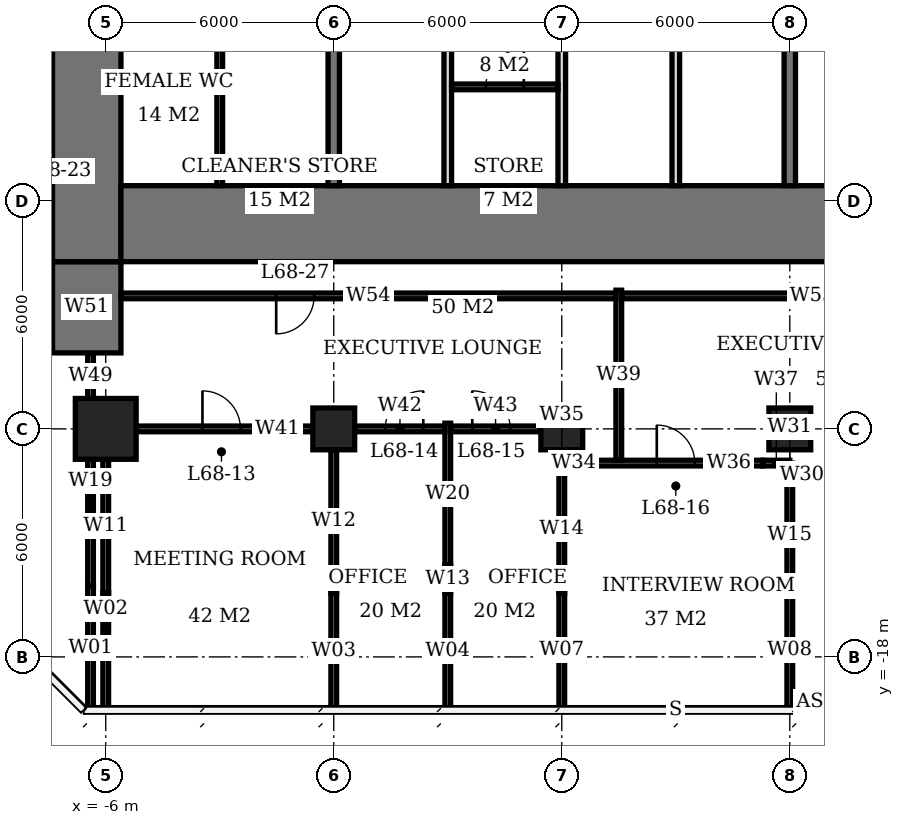
"""IFC4 building model, lengths in metres.
Left out: names, types, materials, properties, quantities, classifications, styles, units other than length and angle.
Written with IfcOpenShell. Run it as: python <this file> out.ifc"""

import sys

from ifc_helpers import new_model, si_unit, direction, frame, frame_2d, origin, origin_2d, place, context, subcontext, project, spatial, rectangle, extrude, element, fill, save


model = new_model("IFC4")
c1 = context("Model", 3, precision=1e-05, world=origin(), true_north=direction((0.0, 1.0)))
c2 = subcontext(c1, "Body", "Model", "MODEL_VIEW")
j1 = project(units=[si_unit("LENGTHUNIT", "METRE"), si_unit("PLANEANGLEUNIT", "RADIAN")], contexts=[c1])
p1 = place(None, origin())
s1 = spatial("IfcSite", under=j1, at=p1, CompositionType="ELEMENT")
p2 = place(p1, origin())
s2 = spatial("IfcBuilding", under=s1, at=p2, CompositionType="ELEMENT")
p3 = place(p2, frame((0.0, 0.0, 276.2)))
s3 = spatial("IfcBuildingStorey", under=s2, at=p3, CompositionType="ELEMENT", Elevation=276.2)
p4 = place(p3, frame((-6.0, -12.0, 0.0), z_axis=(0.0, 0.0, 1.0), x_axis=(1.0, 0.0, 0.0)))
e1 = element("IfcColumn", 1, at=p4, inside=s3, PredefinedType="COLUMN", context=c2, shape_type="SweptSolid", body=[
    extrude(rectangle(XDim=1.6, YDim=1.6, at=origin_2d()), origin(), (0.0, 0.0, 1.0), 3.9),
])
for number, where, z_axis, x_axis in (
    (2, (0.0, -12.0, 0.0), (0.0, 0.0, 1.0), (1.0, 0.0, 0.0)),
    (3, (6.0, -12.0, 0.0), (0.0, 0.0, 1.0), (1.0, 0.0, 0.0)),
    (4, (12.0, -12.0, 0.0), (0.0, 0.0, 1.0), (1.0, 0.0, 0.0)),
):
    element("IfcColumn", number, at=place(p3, frame(where, z_axis=z_axis, x_axis=x_axis)), inside=s3, PredefinedType="COLUMN", context=c2, shape_type="SweptSolid", body=[
        extrude(rectangle(XDim=1.1, YDim=1.1, at=origin_2d()), origin(), (0.0, 0.0, 1.0), 3.9),
    ])
p5 = place(p3, frame((-5.6, -6.6, 0.0), z_axis=(0.0, 0.0, 1.0), x_axis=(1.0, 0.0, 0.0)))
e5 = element("IfcWall", 5, at=p5, inside=s3, PredefinedType="SHEAR", context=c2, shape_type="SweptSolid", body=[
    extrude(rectangle(XDim=23.2, YDim=2.0, at=frame_2d((11.6, 0.0))), origin(), (0.0, 0.0, 1.0), 3.9),
])
p6 = place(p3, frame((-6.5, -7.6, 0.0), z_axis=(0.0, 0.0, 1.0), x_axis=(0.0, 1.0, 0.0)))
e6 = element("IfcWall", 6, at=p6, inside=s3, PredefinedType="SHEAR", context=c2, shape_type="SweptSolid", body=[
    extrude(rectangle(XDim=21.2, YDim=1.8, at=frame_2d((10.6, 0.0))), origin(), (0.0, 0.0, 1.0), 3.9),
])
p7 = place(p6, frame((7.8, 0.0, 0.0)))
e7 = element("IfcOpeningElement", 7, at=p7, cuts=e6, PredefinedType="OPENING", context=c2, shape_type="SweptSolid", body=[
    extrude(rectangle(XDim=1.8, YDim=2.4, at=frame_2d((0.9, 1.2))), frame((0.0, 0.91, 0.0), z_axis=(0.0, -1.0, 0.0), x_axis=(1.0, 0.0, 0.0)), (0.0, 0.0, 1.0), 1.82),
])
p8 = place(p3, frame((-6.5, -10.0, 0.0), z_axis=(0.0, 0.0, 1.0), x_axis=(0.0, 1.0, 0.0)))
e8 = element("IfcWall", 8, at=p8, inside=s3, PredefinedType="SHEAR", context=c2, shape_type="SweptSolid", body=[
    extrude(rectangle(XDim=2.4, YDim=1.8, at=frame_2d((1.2, 0.0))), origin(), (0.0, 0.0, 1.0), 3.9),
])
for number, where, z_axis, x_axis in (
    (9, (0.0, -5.6, 0.0), (0.0, 0.0, 1.0), (0.0, 1.0, 0.0)),
    (10, (12.0, -5.6, 0.0), (0.0, 0.0, 1.0), (0.0, 1.0, 0.0)),
):
    element("IfcWall", number, at=place(p3, frame(where, z_axis=z_axis, x_axis=x_axis)), inside=s3, PredefinedType="SHEAR", context=c2, shape_type="SweptSolid", body=[
        extrude(rectangle(XDim=5.45, YDim=0.3, at=frame_2d((2.725, 0.0))), origin(), (0.0, 0.0, 1.0), 3.9),
    ])
for number, where, z_axis, x_axis in (
    (11, (3.0, -5.6, 0.0), (0.0, 0.0, 1.0), (0.0, 1.0, 0.0)),
    (12, (6.0, -5.6, 0.0), (0.0, 0.0, 1.0), (0.0, 1.0, 0.0)),
    (13, (9.0, -5.6, 0.0), (0.0, 0.0, 1.0), (0.0, 1.0, 0.0)),
):
    element("IfcWall", number, at=place(p3, frame(where, z_axis=z_axis, x_axis=x_axis)), inside=s3, PredefinedType="SOLIDWALL", context=c2, shape_type="SweptSolid", body=[
        extrude(rectangle(XDim=5.45, YDim=0.2, at=frame_2d((2.725, 0.0))), origin(), (0.0, 0.0, 1.0), 3.9),
    ])
p9 = place(p3, frame((-3.0, -5.6, 0.0), z_axis=(0.0, 0.0, 1.0), x_axis=(0.0, 1.0, 0.0)))
e14 = element("IfcWall", 14, at=p9, inside=s3, PredefinedType="PLUMBINGWALL", context=c2, shape_type="SweptSolid", body=[
    extrude(rectangle(XDim=5.45, YDim=0.15, at=frame_2d((2.725, 0.0))), origin(), (0.0, 0.0, 1.0), 3.65),
])
p10 = place(p3, frame((3.1, -3.0, 0.0), z_axis=(0.0, 0.0, 1.0), x_axis=(1.0, 0.0, 0.0)))
e15 = element("IfcWall", 15, at=p10, inside=s3, PredefinedType="PARTITIONING", context=c2, shape_type="SweptSolid", body=[
    extrude(rectangle(XDim=2.8, YDim=0.15, at=frame_2d((1.4, 0.0))), origin(), (0.0, 0.0, 1.0), 3.65),
])
p11 = place(p10, frame((0.9, 0.0, 0.0)))
e16 = element("IfcOpeningElement", 16, at=p11, cuts=e15, PredefinedType="OPENING", context=c2, shape_type="SweptSolid", body=[
    extrude(rectangle(XDim=1.0, YDim=2.1, at=frame_2d((0.5, 1.05))), frame((0.0, 0.085, 0.0), z_axis=(0.0, -1.0, 0.0), x_axis=(1.0, 0.0, 0.0)), (0.0, 0.0, 1.0), 0.17),
])
p12 = place(p3, frame((11.925, -13.2, 0.0), z_axis=(0.0, 0.0, 1.0), x_axis=(1.0, 0.0, 0.0)))
e17 = element("IfcWall", 17, at=p12, inside=s3, PredefinedType="PARTITIONING", context=c2, shape_type="SweptSolid", body=[
    extrude(rectangle(XDim=0.785, YDim=0.15, at=frame_2d((0.393, 0.0))), origin(), (0.0, 0.0, 1.0), 2.65),
])
p13 = place(p3, frame((12.71, -13.2, 0.0), z_axis=(0.0, 0.0, 1.0), x_axis=(1.0, 0.0, 0.0)))
e18 = element("IfcWall", 18, at=p13, inside=s3, PredefinedType="PARTITIONING", context=c2, shape_type="SweptSolid", body=[
    extrude(rectangle(XDim=4.698, YDim=0.15, at=frame_2d((2.349, 0.0))), origin(), (0.0, 0.0, 1.0), 3.65),
])
p14 = place(p13, frame((1.849, 0.0, 0.0)))
e19 = element("IfcOpeningElement", 19, at=p14, cuts=e18, PredefinedType="OPENING", context=c2, shape_type="SweptSolid", body=[
    extrude(rectangle(XDim=1.0, YDim=2.4, at=frame_2d((0.5, 1.2))), frame((0.0, 0.085, 0.0), z_axis=(0.0, -1.0, 0.0), x_axis=(1.0, 0.0, 0.0)), (0.0, 0.0, 1.0), 0.17),
])
p15 = place(p3, frame((5.925, -12.9, 0.0), z_axis=(0.0, 0.0, 1.0), x_axis=(1.0, 0.0, 0.0)))
e20 = element("IfcWall", 20, at=p15, inside=s3, PredefinedType="PARTITIONING", context=c2, shape_type="SweptSolid", body=[
    extrude(rectangle(XDim=0.785, YDim=0.15, at=frame_2d((0.393, 0.0))), origin(), (0.0, 0.0, 1.0), 2.65),
])
p16 = place(p3, frame((6.71, -12.9, 0.0), z_axis=(0.0, 0.0, 1.0), x_axis=(1.0, 0.0, 0.0)))
e21 = element("IfcWall", 21, at=p16, inside=s3, PredefinedType="PARTITIONING", context=c2, shape_type="SweptSolid", body=[
    extrude(rectangle(XDim=4.58, YDim=0.15, at=frame_2d((2.29, 0.0))), origin(), (0.0, 0.0, 1.0), 3.65),
])
p17 = place(p16, frame((1.79, 0.0, 0.0)))
e22 = element("IfcOpeningElement", 22, at=p17, cuts=e21, PredefinedType="OPENING", context=c2, shape_type="SweptSolid", body=[
    extrude(rectangle(XDim=1.0, YDim=2.4, at=frame_2d((0.5, 1.2))), frame((0.0, 0.085, 0.0), z_axis=(0.0, -1.0, 0.0), x_axis=(1.0, 0.0, 0.0)), (0.0, 0.0, 1.0), 0.17),
])
p18 = place(p3, frame((11.29, -12.9, 0.0), z_axis=(0.0, 0.0, 1.0), x_axis=(1.0, 0.0, 0.0)))
e23 = element("IfcWall", 23, at=p18, inside=s3, PredefinedType="PARTITIONING", context=c2, shape_type="SweptSolid", body=[
    extrude(rectangle(XDim=0.71, YDim=0.15, at=frame_2d((0.355, 0.0))), origin(), (0.0, 0.0, 1.0), 2.65),
])
p19 = place(p3, frame((-5.2, -12.0, 0.0), z_axis=(0.0, 0.0, 1.0), x_axis=(1.0, 0.0, 0.0)))
e24 = element("IfcWall", 24, at=p19, inside=s3, PredefinedType="PARTITIONING", context=c2, shape_type="SweptSolid", body=[
    extrude(rectangle(XDim=4.64, YDim=0.15, at=frame_2d((2.32, 0.0))), origin(), (0.0, 0.0, 1.0), 3.65),
])
p20 = place(p19, frame((1.745, 0.0, 0.0)))
e25 = element("IfcOpeningElement", 25, at=p20, cuts=e24, PredefinedType="OPENING", context=c2, shape_type="SweptSolid", body=[
    extrude(rectangle(XDim=1.0, YDim=2.4, at=frame_2d((0.5, 1.2))), frame((0.0, 0.085, 0.0), z_axis=(0.0, -1.0, 0.0), x_axis=(1.0, 0.0, 0.0)), (0.0, 0.0, 1.0), 0.17),
])
p21 = place(p3, frame((0.56, -12.0, 0.0), z_axis=(0.0, 0.0, 1.0), x_axis=(1.0, 0.0, 0.0)))
e26 = element("IfcWall", 26, at=p21, inside=s3, PredefinedType="PARTITIONING", context=c2, shape_type="SweptSolid", body=[
    extrude(rectangle(XDim=2.365, YDim=0.15, at=frame_2d((1.183, 0.0))), origin(), (0.0, 0.0, 1.0), 3.65),
])
p22 = place(p21, frame((0.795, 0.0, 0.0)))
e27 = element("IfcOpeningElement", 27, at=p22, cuts=e26, PredefinedType="OPENING", context=c2, shape_type="SweptSolid", body=[
    extrude(rectangle(XDim=1.0, YDim=2.4, at=frame_2d((0.5, 1.2))), frame((0.0, 0.085, 0.0), z_axis=(0.0, -1.0, 0.0), x_axis=(1.0, 0.0, 0.0)), (0.0, 0.0, 1.0), 0.17),
])
p23 = place(p3, frame((3.075, -12.0, 0.0), z_axis=(0.0, 0.0, 1.0), x_axis=(1.0, 0.0, 0.0)))
e28 = element("IfcWall", 28, at=p23, inside=s3, PredefinedType="PARTITIONING", context=c2, shape_type="SweptSolid", body=[
    extrude(rectangle(XDim=2.365, YDim=0.15, at=frame_2d((1.183, 0.0))), origin(), (0.0, 0.0, 1.0), 3.65),
])
p24 = place(p23, frame((0.57, 0.0, 0.0)))
e29 = element("IfcOpeningElement", 29, at=p24, cuts=e28, PredefinedType="OPENING", context=c2, shape_type="SweptSolid", body=[
    extrude(rectangle(XDim=1.0, YDim=2.4, at=frame_2d((0.5, 1.2))), frame((0.0, 0.085, 0.0), z_axis=(0.0, -1.0, 0.0), x_axis=(1.0, 0.0, 0.0)), (0.0, 0.0, 1.0), 0.17),
])
p25 = place(p3, frame((-6.0, -19.375, 0.0), z_axis=(0.0, 0.0, 1.0), x_axis=(0.0, 1.0, 0.0)))
e30 = element("IfcWall", 30, at=p25, inside=s3, PredefinedType="PARTITIONING", context=c2, shape_type="SweptSolid", body=[
    extrude(rectangle(XDim=3.065, YDim=0.15, at=frame_2d((1.532, 0.0))), origin(), (0.0, 0.0, 1.0), 3.65),
])
p26 = place(p3, frame((-6.0, -16.31, 0.0), z_axis=(0.0, 0.0, 1.0), x_axis=(0.0, 1.0, 0.0)))
e31 = element("IfcWall", 31, at=p26, inside=s3, PredefinedType="PARTITIONING", context=c2, shape_type="SweptSolid", body=[
    extrude(rectangle(XDim=3.51, YDim=0.15, at=frame_2d((1.755, 0.0))), origin(), (0.0, 0.0, 1.0), 2.65),
])
p27 = place(p3, frame((0.0, -19.375, 0.0), z_axis=(0.0, 0.0, 1.0), x_axis=(0.0, 1.0, 0.0)))
e32 = element("IfcWall", 32, at=p27, inside=s3, PredefinedType="PARTITIONING", context=c2, shape_type="SweptSolid", body=[
    extrude(rectangle(XDim=3.065, YDim=0.15, at=frame_2d((1.532, 0.0))), origin(), (0.0, 0.0, 1.0), 3.65),
])
p28 = place(p3, frame((0.0, -16.31, 0.0), z_axis=(0.0, 0.0, 1.0), x_axis=(0.0, 1.0, 0.0)))
e33 = element("IfcWall", 33, at=p28, inside=s3, PredefinedType="PARTITIONING", context=c2, shape_type="SweptSolid", body=[
    extrude(rectangle(XDim=3.76, YDim=0.15, at=frame_2d((1.88, 0.0))), origin(), (0.0, 0.0, 1.0), 2.65),
])
p29 = place(p3, frame((3.0, -19.375, 0.0), z_axis=(0.0, 0.0, 1.0), x_axis=(0.0, 1.0, 0.0)))
e34 = element("IfcWall", 34, at=p29, inside=s3, PredefinedType="PARTITIONING", context=c2, shape_type="SweptSolid", body=[
    extrude(rectangle(XDim=3.065, YDim=0.15, at=frame_2d((1.532, 0.0))), origin(), (0.0, 0.0, 1.0), 3.65),
])
p30 = place(p3, frame((3.0, -16.31, 0.0), z_axis=(0.0, 0.0, 1.0), x_axis=(0.0, 1.0, 0.0)))
e35 = element("IfcWall", 35, at=p30, inside=s3, PredefinedType="PARTITIONING", context=c2, shape_type="SweptSolid", body=[
    extrude(rectangle(XDim=0.72, YDim=0.15, at=frame_2d((0.36, 0.0))), origin(), (0.0, 0.0, 1.0), 2.65),
])
p31 = place(p3, frame((3.0, -15.59, 0.0), z_axis=(0.0, 0.0, 1.0), x_axis=(0.0, 1.0, 0.0)))
e36 = element("IfcWall", 36, at=p31, inside=s3, PredefinedType="PARTITIONING", context=c2, shape_type="SweptSolid", body=[
    extrude(rectangle(XDim=3.74, YDim=0.15, at=frame_2d((1.87, 0.0))), origin(), (0.0, 0.0, 1.0), 3.65),
])
p32 = place(p3, frame((6.0, -19.35, 0.0), z_axis=(0.0, 0.0, 1.0), x_axis=(0.0, 1.0, 0.0)))
e37 = element("IfcWall", 37, at=p32, inside=s3, PredefinedType="PARTITIONING", context=c2, shape_type="SweptSolid", body=[
    extrude(rectangle(XDim=3.04, YDim=0.15, at=frame_2d((1.52, 0.0))), origin(), (0.0, 0.0, 1.0), 3.65),
])
p33 = place(p3, frame((6.0, -16.31, 0.0), z_axis=(0.0, 0.0, 1.0), x_axis=(0.0, 1.0, 0.0)))
e38 = element("IfcWall", 38, at=p33, inside=s3, PredefinedType="PARTITIONING", context=c2, shape_type="SweptSolid", body=[
    extrude(rectangle(XDim=3.335, YDim=0.15, at=frame_2d((1.667, 0.0))), origin(), (0.0, 0.0, 1.0), 2.65),
])
p34 = place(p3, frame((6.0, -12.9, 0.0), z_axis=(0.0, 0.0, 1.0), x_axis=(0.0, 1.0, 0.0)))
e39 = element("IfcWall", 39, at=p34, inside=s3, PredefinedType="PARTITIONING", context=c2, shape_type="SweptSolid", body=[
    extrude(rectangle(XDim=0.35, YDim=0.15, at=frame_2d((0.175, 0.0))), origin(), (0.0, 0.0, 1.0), 2.65),
])
p35 = place(p3, frame((12.0, -19.35, 0.0), z_axis=(0.0, 0.0, 1.0), x_axis=(0.0, 1.0, 0.0)))
e40 = element("IfcWall", 40, at=p35, inside=s3, PredefinedType="PARTITIONING", context=c2, shape_type="SweptSolid", body=[
    extrude(rectangle(XDim=3.04, YDim=0.15, at=frame_2d((1.52, 0.0))), origin(), (0.0, 0.0, 1.0), 3.65),
])
p36 = place(p3, frame((12.0, -16.31, 0.0), z_axis=(0.0, 0.0, 1.0), x_axis=(0.0, 1.0, 0.0)))
e41 = element("IfcWall", 41, at=p36, inside=s3, PredefinedType="PARTITIONING", context=c2, shape_type="SweptSolid", body=[
    extrude(rectangle(XDim=3.035, YDim=0.15, at=frame_2d((1.518, 0.0))), origin(), (0.0, 0.0, 1.0), 2.65),
])
p37 = place(p3, frame((12.0, -13.2, 0.0), z_axis=(0.0, 0.0, 1.0), x_axis=(0.0, 1.0, 0.0)))
e42 = element("IfcWall", 42, at=p37, inside=s3, PredefinedType="PARTITIONING", context=c2, shape_type="SweptSolid", body=[
    extrude(rectangle(XDim=0.3, YDim=0.15, at=frame_2d((0.15, 0.0))), origin(), (0.0, 0.0, 1.0), 2.65),
])
p38 = place(p3, frame((-6.4, -19.375, 0.0), z_axis=(0.0, 0.0, 1.0), x_axis=(0.0, 1.0, 0.0)))
e43 = element("IfcWall", 43, at=p38, inside=s3, PredefinedType="PARTITIONING", context=c2, shape_type="SweptSolid", body=[
    extrude(rectangle(XDim=3.235, YDim=0.15, at=frame_2d((1.618, 0.0))), origin(), (0.0, 0.0, 1.0), 3.65),
])
p39 = place(p3, frame((-6.4, -16.14, 0.0), z_axis=(0.0, 0.0, 1.0), x_axis=(0.0, 1.0, 0.0)))
e44 = element("IfcWall", 44, at=p39, inside=s3, PredefinedType="PARTITIONING", context=c2, shape_type="SweptSolid", body=[
    extrude(rectangle(XDim=3.34, YDim=0.15, at=frame_2d((1.67, 0.0))), origin(), (0.0, 0.0, 1.0), 2.65),
])
p40 = place(p3, frame((-6.4, -11.2, 0.0), z_axis=(0.0, 0.0, 1.0), x_axis=(0.0, 1.0, 0.0)))
e45 = element("IfcWall", 45, at=p40, inside=s3, PredefinedType="PARTITIONING", context=c2, shape_type="SweptSolid", body=[
    extrude(rectangle(XDim=1.2, YDim=0.15, at=frame_2d((0.6, 0.0))), origin(), (0.0, 0.0, 1.0), 3.65),
])
p41 = place(p3, frame((7.425, -8.5, 0.0), z_axis=(0.0, 0.0, 1.0), x_axis=(-1.0, 0.0, 0.0)))
e46 = element("IfcWall", 46, at=p41, inside=s3, PredefinedType="PARTITIONING", context=c2, shape_type="SweptSolid", body=[
    extrude(rectangle(XDim=13.025, YDim=0.15, at=frame_2d((6.513, 0.0))), origin(), (0.0, 0.0, 1.0), 3.65),
])
p42 = place(p41, frame((7.94, 0.0, 0.0)))
e47 = element("IfcOpeningElement", 47, at=p42, cuts=e46, PredefinedType="OPENING", context=c2, shape_type="SweptSolid", body=[
    extrude(rectangle(XDim=1.0, YDim=2.4, at=frame_2d((0.5, 1.2))), frame((0.0, 0.085, 0.0), z_axis=(0.0, -1.0, 0.0), x_axis=(1.0, 0.0, 0.0)), (0.0, 0.0, 1.0), 0.17),
])
p43 = place(p3, frame((7.5, -12.825, 0.0), z_axis=(0.0, 0.0, 1.0), x_axis=(0.0, 1.0, 0.0)))
e48 = element("IfcWall", 48, at=p43, inside=s3, PredefinedType="PARTITIONING", context=c2, shape_type="SweptSolid", body=[
    extrude(rectangle(XDim=4.475, YDim=0.15, at=frame_2d((2.237, 0.0))), origin(), (0.0, 0.0, 1.0), 3.65),
])
p44 = place(p3, frame((7.575, -8.5, 0.0), z_axis=(0.0, 0.0, 1.0), x_axis=(1.0, 0.0, 0.0)))
e49 = element("IfcWall", 49, at=p44, inside=s3, PredefinedType="PARTITIONING", context=c2, shape_type="SweptSolid", body=[
    extrude(rectangle(XDim=10.025, YDim=0.15, at=frame_2d((5.013, 0.0))), origin(), (0.0, 0.0, 1.0), 3.65),
])
p45 = place(p11, origin())
e50 = element("IfcDoor", 50, at=p45, inside=s3, OperationType="SINGLE_SWING_RIGHT", PredefinedType="DOOR", context=c2, shape_type="SweptSolid", body=[
    extrude(rectangle(XDim=1.0, YDim=2.1, at=frame_2d((0.5, 1.05))), frame((0.0, 0.025, 0.0), z_axis=(0.0, -1.0, 0.0), x_axis=(1.0, 0.0, 0.0)), (0.0, 0.0, 1.0), 0.05),
])
fill(e16, e50)
p46 = place(p20, origin())
e51 = element("IfcDoor", 51, at=p46, inside=s3, OperationType="SINGLE_SWING_LEFT", PredefinedType="DOOR", context=c2, shape_type="SweptSolid", body=[
    extrude(rectangle(XDim=1.0, YDim=2.4, at=frame_2d((0.5, 1.2))), frame((0.0, 0.025, 0.0), z_axis=(0.0, -1.0, 0.0), x_axis=(1.0, 0.0, 0.0)), (0.0, 0.0, 1.0), 0.05),
])
fill(e25, e51)
p47 = place(p22, origin())
e52 = element("IfcDoor", 52, at=p47, inside=s3, OperationType="SINGLE_SWING_RIGHT", PredefinedType="DOOR", context=c2, shape_type="SweptSolid", body=[
    extrude(rectangle(XDim=1.0, YDim=2.4, at=frame_2d((0.5, 1.2))), frame((0.0, 0.025, 0.0), z_axis=(0.0, -1.0, 0.0), x_axis=(1.0, 0.0, 0.0)), (0.0, 0.0, 1.0), 0.05),
])
fill(e27, e52)
p48 = place(p24, origin())
e53 = element("IfcDoor", 53, at=p48, inside=s3, OperationType="SINGLE_SWING_LEFT", PredefinedType="DOOR", context=c2, shape_type="SweptSolid", body=[
    extrude(rectangle(XDim=1.0, YDim=2.4, at=frame_2d((0.5, 1.2))), frame((0.0, 0.025, 0.0), z_axis=(0.0, -1.0, 0.0), x_axis=(1.0, 0.0, 0.0)), (0.0, 0.0, 1.0), 0.05),
])
fill(e29, e53)
p49 = place(p17, origin())
e54 = element("IfcDoor", 54, at=p49, inside=s3, OperationType="SINGLE_SWING_LEFT", PredefinedType="DOOR", context=c2, shape_type="SweptSolid", body=[
    extrude(rectangle(XDim=1.0, YDim=2.4, at=frame_2d((0.5, 1.2))), frame((0.0, 0.025, 0.0), z_axis=(0.0, -1.0, 0.0), x_axis=(1.0, 0.0, 0.0)), (0.0, 0.0, 1.0), 0.05),
])
fill(e22, e54)
p50 = place(p42, origin())
e55 = element("IfcDoor", 55, at=p50, inside=s3, OperationType="SINGLE_SWING_RIGHT", PredefinedType="DOOR", context=c2, shape_type="SweptSolid", body=[
    extrude(rectangle(XDim=1.0, YDim=2.4, at=frame_2d((0.5, 1.2))), frame((0.0, 0.025, 0.0), z_axis=(0.0, -1.0, 0.0), x_axis=(1.0, 0.0, 0.0)), (0.0, 0.0, 1.0), 0.05),
])
fill(e47, e55)
save(model, sys.argv[1])
